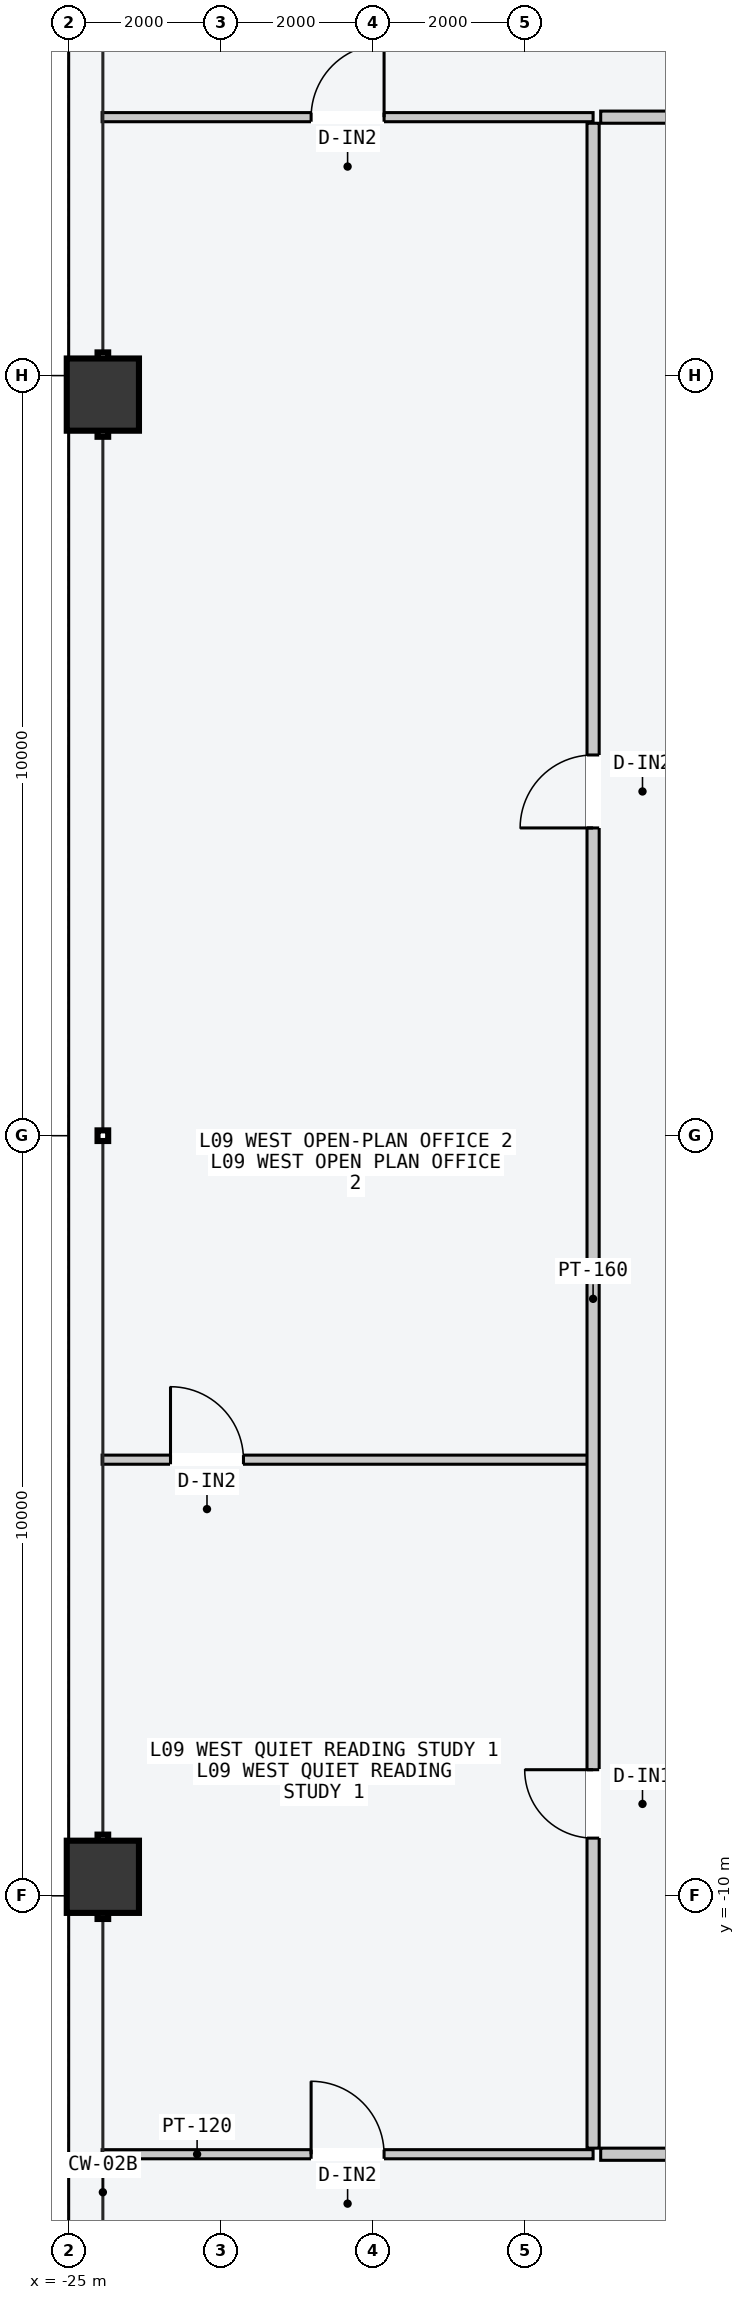
"""IFC4 building model, lengths in metres.
Left out: names, types, materials, properties, quantities, classifications, styles, units other than length and angle.
Written with IfcOpenShell. Run it as: python <this file> out.ifc"""

import sys

from ifc_helpers import new_model, si_unit, direction, frame, frame_2d, origin, origin_2d, place, context, subcontext, project, spatial, rectangle, hollow_rectangle, extrude, element, fill, save


model = new_model("IFC4")
c1 = context("Model", 3, precision=1e-05, world=origin(), true_north=direction((0.0, 1.0)))
c2 = subcontext(c1, "Body", "Model", "MODEL_VIEW")
j1 = project(units=[si_unit("LENGTHUNIT", "METRE"), si_unit("PLANEANGLEUNIT", "RADIAN")], contexts=[c1])
p1 = place(None, origin())
s1 = spatial("IfcSite", under=j1, at=p1, CompositionType="ELEMENT")
p2 = place(p1, origin())
s2 = spatial("IfcBuilding", under=s1, at=p2, CompositionType="ELEMENT")
p3 = place(p2, frame((0.0, 0.0, 38.4)))
s3 = spatial("IfcBuildingStorey", under=s2, at=p3, CompositionType="ELEMENT", Elevation=38.4)
for number, where, z_axis, x_axis in (
    (1, (-24.55, -9.75, 0.0), (0.0, 0.0, 1.0), (0.0, 1.0, 0.0)),
    (2, (-24.55, 9.75, 0.0), (0.0, 0.0, 1.0), (0.0, 1.0, 0.0)),
):
    element("IfcColumn", number, at=place(p3, frame(where, z_axis=z_axis, x_axis=x_axis)), inside=s3, PredefinedType="COLUMN", context=c2, shape_type="SweptSolid", body=[
        extrude(hollow_rectangle(XDim=0.95, YDim=0.95, WallThickness=0.048, at=origin_2d()), origin(), (0.0, 0.0, 1.0), 3.6),
    ])
p4 = place(p3, frame((-18.0, 13.4, 0.0), z_axis=(0.0, 0.0, 1.0), x_axis=(1.0, 0.0, 0.0)))
e3 = element("IfcWall", 3, at=p4, inside=s3, PredefinedType="PARTITIONING", context=c2, shape_type="SweptSolid", body=[
    extrude(rectangle(XDim=36.0, YDim=0.16, at=frame_2d((18.0, 0.0))), origin(), (0.0, 0.0, 1.0), 3.4),
])
p5 = place(p4, frame((7.105, 0.0, 0.0)))
e4 = element("IfcOpeningElement", 4, at=p5, cuts=e3, PredefinedType="OPENING", context=c2, shape_type="SweptSolid", body=[
    extrude(rectangle(XDim=1.4, YDim=2.2, at=frame_2d((0.7, 1.1))), frame((0.0, 0.09, 0.0), z_axis=(0.0, -1.0, 0.0), x_axis=(1.0, 0.0, 0.0)), (0.0, 0.0, 1.0), 0.18),
])
p6 = place(p4, frame((21.333, 0.0, 0.0)))
e5 = element("IfcOpeningElement", 5, at=p6, cuts=e3, PredefinedType="OPENING", context=c2, shape_type="SweptSolid", body=[
    extrude(rectangle(XDim=0.9, YDim=2.15, at=frame_2d((0.45, 1.075))), frame((0.0, 0.09, 0.0), z_axis=(0.0, -1.0, 0.0), x_axis=(1.0, 0.0, 0.0)), (0.0, 0.0, 1.0), 0.18),
])
p7 = place(p4, frame((31.498, 0.0, 0.0)))
e6 = element("IfcOpeningElement", 6, at=p7, cuts=e3, PredefinedType="OPENING", context=c2, shape_type="SweptSolid", body=[
    extrude(rectangle(XDim=0.96, YDim=2.18, at=frame_2d((0.48, 1.09))), frame((0.0, 0.09, 0.0), z_axis=(0.0, -1.0, 0.0), x_axis=(1.0, 0.0, 0.0)), (0.0, 0.0, 1.0), 0.18),
])
p8 = place(p3, frame((-24.56, 13.4, 0.0), z_axis=(0.0, 0.0, 1.0), x_axis=(1.0, 0.0, 0.0)))
e7 = element("IfcWall", 7, at=p8, inside=s3, PredefinedType="PARTITIONING", context=c2, shape_type="SweptSolid", body=[
    extrude(rectangle(XDim=6.46, YDim=0.12, at=frame_2d((3.23, 0.0))), origin(), (0.0, 0.0, 1.0), 3.4),
])
p9 = place(p8, frame((2.75, 0.0, 0.0)))
e8 = element("IfcOpeningElement", 8, at=p9, cuts=e7, PredefinedType="OPENING", context=c2, shape_type="SweptSolid", body=[
    extrude(rectangle(XDim=0.96, YDim=2.18, at=frame_2d((0.48, 1.09))), frame((0.0, 0.07, 0.0), z_axis=(0.0, -1.0, 0.0), x_axis=(1.0, 0.0, 0.0)), (0.0, 0.0, 1.0), 0.14),
])
p10 = place(p3, frame((-18.0, -13.4, 0.0), z_axis=(0.0, 0.0, 1.0), x_axis=(1.0, 0.0, 0.0)))
e9 = element("IfcWall", 9, at=p10, inside=s3, PredefinedType="PARTITIONING", context=c2, shape_type="SweptSolid", body=[
    extrude(rectangle(XDim=36.0, YDim=0.16, at=frame_2d((18.0, 0.0))), origin(), (0.0, 0.0, 1.0), 3.4),
])
p11 = place(p10, frame((7.225, 0.0, 0.0)))
e10 = element("IfcOpeningElement", 10, at=p11, cuts=e9, PredefinedType="OPENING", context=c2, shape_type="SweptSolid", body=[
    extrude(rectangle(XDim=1.02, YDim=2.2, at=frame_2d((0.51, 1.1))), frame((0.0, 0.09, 0.0), z_axis=(0.0, -1.0, 0.0), x_axis=(1.0, 0.0, 0.0)), (0.0, 0.0, 1.0), 0.18),
])
p12 = place(p10, frame((25.205, 0.0, 0.0)))
e11 = element("IfcOpeningElement", 11, at=p12, cuts=e9, PredefinedType="OPENING", context=c2, shape_type="SweptSolid", body=[
    extrude(rectangle(XDim=1.06, YDim=2.2, at=frame_2d((0.53, 1.1))), frame((0.0, 0.09, 0.0), z_axis=(0.0, -1.0, 0.0), x_axis=(1.0, 0.0, 0.0)), (0.0, 0.0, 1.0), 0.18),
])
p13 = place(p3, frame((-24.56, -13.4, 0.0), z_axis=(0.0, 0.0, 1.0), x_axis=(1.0, 0.0, 0.0)))
e12 = element("IfcWall", 12, at=p13, inside=s3, PredefinedType="PARTITIONING", context=c2, shape_type="SweptSolid", body=[
    extrude(rectangle(XDim=6.46, YDim=0.12, at=frame_2d((3.23, 0.0))), origin(), (0.0, 0.0, 1.0), 3.4),
])
p14 = place(p13, frame((2.75, 0.0, 0.0)))
e13 = element("IfcOpeningElement", 13, at=p14, cuts=e12, PredefinedType="OPENING", context=c2, shape_type="SweptSolid", body=[
    extrude(rectangle(XDim=0.96, YDim=2.18, at=frame_2d((0.48, 1.09))), frame((0.0, 0.07, 0.0), z_axis=(0.0, -1.0, 0.0), x_axis=(1.0, 0.0, 0.0)), (0.0, 0.0, 1.0), 0.14),
])
p15 = place(p3, frame((-24.56, -4.262, 0.0), z_axis=(0.0, 0.0, 1.0), x_axis=(1.0, 0.0, 0.0)))
e14 = element("IfcWall", 14, at=p15, inside=s3, PredefinedType="PARTITIONING", context=c2, shape_type="SweptSolid", body=[
    extrude(rectangle(XDim=6.4, YDim=0.12, at=frame_2d((3.2, 0.0))), origin(), (0.0, 0.0, 1.0), 3.4),
])
p16 = place(p15, frame((0.9, 0.0, 0.0)))
e15 = element("IfcOpeningElement", 15, at=p16, cuts=e14, PredefinedType="OPENING", context=c2, shape_type="SweptSolid", body=[
    extrude(rectangle(XDim=0.96, YDim=2.18, at=frame_2d((0.48, 1.09))), frame((0.0, 0.07, 0.0), z_axis=(0.0, -1.0, 0.0), x_axis=(1.0, 0.0, 0.0)), (0.0, 0.0, 1.0), 0.14),
])
p17 = place(p3, frame((-18.1, -13.32, 0.0), z_axis=(0.0, 0.0, 1.0), x_axis=(0.0, 1.0, 0.0)))
e16 = element("IfcWall", 16, at=p17, inside=s3, PredefinedType="PARTITIONING", context=c2, shape_type="SweptSolid", body=[
    extrude(rectangle(XDim=26.64, YDim=0.16, at=frame_2d((13.32, 0.0))), origin(), (0.0, 0.0, 1.0), 3.4),
])
p18 = place(p17, frame((4.079, 0.0, 0.0)))
e17 = element("IfcOpeningElement", 17, at=p18, cuts=e16, PredefinedType="OPENING", context=c2, shape_type="SweptSolid", body=[
    extrude(rectangle(XDim=0.9, YDim=2.15, at=frame_2d((0.45, 1.075))), frame((0.0, 0.09, 0.0), z_axis=(0.0, -1.0, 0.0), x_axis=(1.0, 0.0, 0.0)), (0.0, 0.0, 1.0), 0.18),
])
p19 = place(p17, frame((17.369, 0.0, 0.0)))
e18 = element("IfcOpeningElement", 18, at=p19, cuts=e16, PredefinedType="OPENING", context=c2, shape_type="SweptSolid", body=[
    extrude(rectangle(XDim=0.96, YDim=2.18, at=frame_2d((0.48, 1.09))), frame((0.0, 0.09, 0.0), z_axis=(0.0, -1.0, 0.0), x_axis=(1.0, 0.0, 0.0)), (0.0, 0.0, 1.0), 0.18),
])
p20 = place(p9, origin())
e19 = element("IfcDoor", 19, at=p20, inside=s3, OperationType="SINGLE_SWING_RIGHT", PredefinedType="DOOR", context=c2, shape_type="SweptSolid", body=[
    extrude(rectangle(XDim=0.96, YDim=2.18, at=frame_2d((0.48, 1.09))), frame((0.0, 0.025, 0.0), z_axis=(0.0, -1.0, 0.0), x_axis=(1.0, 0.0, 0.0)), (0.0, 0.0, 1.0), 0.05),
])
fill(e8, e19)
p21 = place(p14, origin())
e20 = element("IfcDoor", 20, at=p21, inside=s3, OperationType="SINGLE_SWING_LEFT", PredefinedType="DOOR", context=c2, shape_type="SweptSolid", body=[
    extrude(rectangle(XDim=0.96, YDim=2.18, at=frame_2d((0.48, 1.09))), frame((0.0, 0.025, 0.0), z_axis=(0.0, -1.0, 0.0), x_axis=(1.0, 0.0, 0.0)), (0.0, 0.0, 1.0), 0.05),
])
fill(e13, e20)
p22 = place(p16, origin())
e21 = element("IfcDoor", 21, at=p22, inside=s3, OperationType="SINGLE_SWING_LEFT", PredefinedType="DOOR", context=c2, shape_type="SweptSolid", body=[
    extrude(rectangle(XDim=0.96, YDim=2.18, at=frame_2d((0.48, 1.09))), frame((0.0, 0.025, 0.0), z_axis=(0.0, -1.0, 0.0), x_axis=(1.0, 0.0, 0.0)), (0.0, 0.0, 1.0), 0.05),
])
fill(e15, e21)
p23 = place(p18, origin())
e22 = element("IfcDoor", 22, at=p23, inside=s3, OperationType="SINGLE_SWING_RIGHT", PredefinedType="DOOR", context=c2, shape_type="SweptSolid", body=[
    extrude(rectangle(XDim=0.9, YDim=2.15, at=frame_2d((0.45, 1.075))), frame((0.0, 0.025, 0.0), z_axis=(0.0, -1.0, 0.0), x_axis=(1.0, 0.0, 0.0)), (0.0, 0.0, 1.0), 0.05),
])
fill(e17, e22)
p24 = place(p19, origin())
e23 = element("IfcDoor", 23, at=p24, inside=s3, OperationType="SINGLE_SWING_LEFT", PredefinedType="DOOR", context=c2, shape_type="SweptSolid", body=[
    extrude(rectangle(XDim=0.96, YDim=2.18, at=frame_2d((0.48, 1.09))), frame((0.0, 0.025, 0.0), z_axis=(0.0, -1.0, 0.0), x_axis=(1.0, 0.0, 0.0)), (0.0, 0.0, 1.0), 0.05),
])
fill(e18, e23)
save(model, sys.argv[1])
